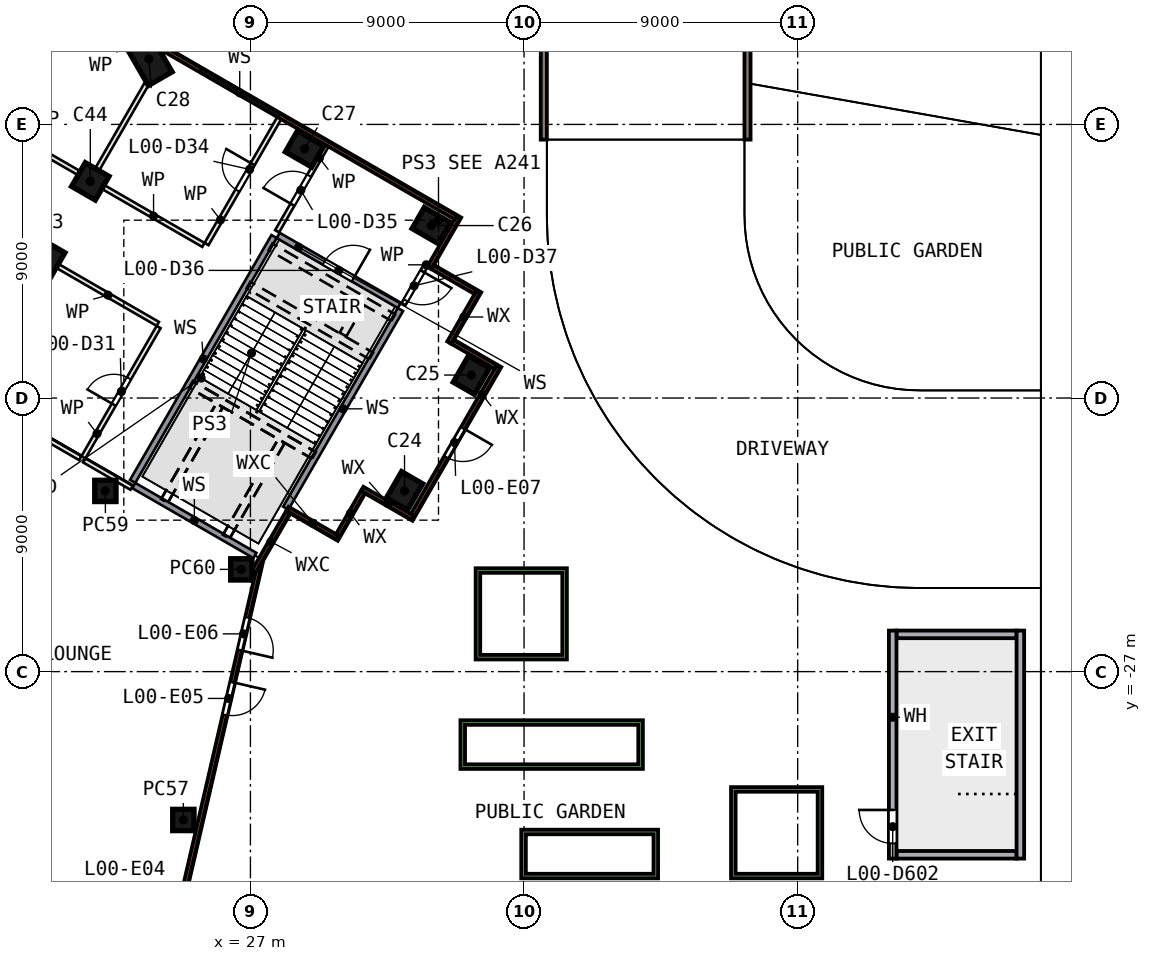
"""IFC4 building model, lengths in metres.
Left out: names, types, materials, properties, quantities, classifications, styles, units other than length and angle.
Written with IfcOpenShell. Run it as: python <this file> out.ifc"""

import sys

from ifc_helpers import new_model, si_unit, direction, frame, frame_2d, origin, origin_2d, place, context, subcontext, project, spatial, polyline, rectangle, outline, extrude, element, fill, save


model = new_model("IFC4")
c1 = context("Model", 3, precision=1e-05, world=origin(), true_north=direction((0.0, 1.0)))
c2 = subcontext(c1, "Body", "Model", "MODEL_VIEW")
j1 = project(units=[si_unit("LENGTHUNIT", "METRE"), si_unit("PLANEANGLEUNIT", "RADIAN")], contexts=[c1])
p1 = place(None, origin())
s1 = spatial("IfcSite", under=j1, at=p1, CompositionType="ELEMENT")
p2 = place(p1, origin())
s2 = spatial("IfcBuilding", under=s1, at=p2, CompositionType="ELEMENT")
p3 = place(p2, origin())
s3 = spatial("IfcBuildingStorey", under=s2, at=p3, CompositionType="ELEMENT", Elevation=0.0)
for number, where, z_axis, x_axis in (
    (1, (32.069, -21.055, 0.0), (0.0, 0.0, 1.0), (0.5, 0.866, 0.0)),
    (2, (34.269, -17.245, 0.0), (0.0, 0.0, 1.0), (0.5, 0.866, 0.0)),
    (3, (32.951, -12.327, 0.0), (0.0, 0.0, 1.0), (-0.866, 0.5, 0.0)),
    (4, (28.783, -9.805, 0.0), (0.0, 0.0, 1.0), (-0.866, 0.5, 0.0)),
):
    element("IfcColumn", number, at=place(p3, frame(where, z_axis=z_axis, x_axis=x_axis)), inside=s3, PredefinedType="COLUMN", context=c2, shape_type="SweptSolid", body=[
        extrude(rectangle(XDim=1.0, YDim=0.8, at=origin_2d()), origin(), (0.0, 0.0, 1.0), 7.55),
    ])
p4 = place(p3, frame((23.658, -6.846, 0.0), z_axis=(0.0, 0.0, 1.0), x_axis=(0.5, -0.866025404, 0.0)))
e5 = element("IfcColumn", 5, at=p4, inside=s3, PredefinedType="COLUMN", context=c2, shape_type="SweptSolid", body=[
    extrude(rectangle(XDim=1.5, YDim=0.9, at=origin_2d()), origin(), (0.0, 0.0, 1.0), 7.55),
])
for number, where, z_axis, x_axis in (
    (6, (20.283, -13.385, 0.0), (0.0, 0.0, 1.0), (0.866, -0.5, 0.0)),
    (7, (21.733, -10.873, 0.0), (0.0, 0.0, 1.0), (0.866, -0.5, 0.0)),
):
    element("IfcColumn", number, at=place(p3, frame(where, z_axis=z_axis, x_axis=x_axis)), inside=s3, PredefinedType="COLUMN", context=c2, shape_type="SweptSolid", body=[
        extrude(rectangle(XDim=0.9, YDim=0.9, at=origin_2d()), origin(), (0.0, 0.0, 1.0), 7.55),
    ])
for number, where, z_axis, x_axis in (
    (8, (24.794, -31.88, 0.0), (0.0, 0.0, 1.0), (0.0, -1.0, 0.0)),
    (9, (22.229, -21.055, 0.0), (0.0, 0.0, 1.0), (0.0, -1.0, 0.0)),
    (10, (26.7, -23.637, 0.0), (0.0, 0.0, 1.0), (0.0, -1.0, 0.0)),
):
    element("IfcColumn", number, at=place(p3, frame(where, z_axis=z_axis, x_axis=x_axis)), inside=s3, PredefinedType="COLUMN", context=c2, shape_type="SweptSolid", body=[
        extrude(rectangle(XDim=0.7, YDim=0.7, at=origin_2d()), origin(), (0.0, 0.0, 1.0), 8.0),
    ])
for number, where, z_axis, x_axis in (
    (11, (36.65, -9.5, -0.06), (0.0, 0.0, 1.0), (0.0, 1.0, 0.0)),
    (12, (43.35, -9.5, -0.06), (0.0, 0.0, 1.0), (0.0, 1.0, 0.0)),
):
    element("IfcWall", number, at=place(p3, frame(where, z_axis=z_axis, x_axis=x_axis)), inside=s3, PredefinedType="PARAPET", context=c2, shape_type="SweptSolid", body=[
        extrude(rectangle(XDim=18.7, YDim=0.2, at=frame_2d((9.35, 0.0))), origin(), (0.0, 0.0, 1.0), 1.18),
    ])
p5 = place(p3, frame((27.288, -23.537, 0.0), z_axis=(0.0, 0.0, 1.0), x_axis=(-0.22528195, -0.974293612, 0.0)))
e13 = element("IfcWall", 13, at=p5, inside=s3, PredefinedType="SOLIDWALL", context=c2, shape_type="SweptSolid", body=[
    extrude(rectangle(XDim=14.772, YDim=0.14, at=frame_2d((7.386, 0.0))), origin(), (0.0, 0.0, 1.0), 7.55),
])
p6 = place(p5, frame((10.815, 0.0, 0.0)))
e14 = element("IfcOpeningElement", 14, at=p6, cuts=e13, PredefinedType="OPENING", context=c2, shape_type="SweptSolid", body=[
    extrude(rectangle(XDim=1.1, YDim=2.4, at=frame_2d((0.55, 1.2))), frame((0.0, 0.08, 0.0), z_axis=(0.0, -1.0, 0.0), x_axis=(1.0, 0.0, 0.0)), (0.0, 0.0, 1.0), 0.16),
])
p7 = place(p5, frame((3.91, 0.0, 0.0)))
e15 = element("IfcOpeningElement", 15, at=p7, cuts=e13, PredefinedType="OPENING", context=c2, shape_type="SweptSolid", body=[
    extrude(rectangle(XDim=1.1, YDim=2.4, at=frame_2d((0.55, 1.2))), frame((0.0, 0.08, 0.0), z_axis=(0.0, -1.0, 0.0), x_axis=(1.0, 0.0, 0.0)), (0.0, 0.0, 1.0), 0.16),
])
p8 = place(p5, frame((1.73, 0.0, 0.0)))
e16 = element("IfcOpeningElement", 16, at=p8, cuts=e13, PredefinedType="OPENING", context=c2, shape_type="SweptSolid", body=[
    extrude(rectangle(XDim=1.1, YDim=2.4, at=frame_2d((0.55, 1.2))), frame((0.0, 0.08, 0.0), z_axis=(0.0, -1.0, 0.0), x_axis=(1.0, 0.0, 0.0)), (0.0, 0.0, 1.0), 0.16),
])
p9 = place(p3, frame((27.101, -23.72, 0.0), z_axis=(0.0, 0.0, 1.0), x_axis=(0.499965247, 0.866045467, 0.0)))
e17 = element("IfcWall", 17, at=p9, inside=s3, PredefinedType="SOLIDWALL", context=c2, shape_type="SweptSolid", body=[
    extrude(rectangle(XDim=2.292, YDim=0.14, at=frame_2d((1.146, 0.0))), origin(), (0.0, 0.0, 1.0), 7.55),
])
p10 = place(p3, frame((28.221, -21.64, 0.0), z_axis=(0.0, 0.0, 1.0), x_axis=(0.866011627, -0.500023862, 0.0)))
e18 = element("IfcWall", 18, at=p10, inside=s3, PredefinedType="SOLIDWALL", context=c2, shape_type="SweptSolid", body=[
    extrude(rectangle(XDim=1.94, YDim=0.14, at=frame_2d((0.97, 0.0))), origin(), (0.0, 0.0, 1.0), 7.55),
])
p11 = place(p3, frame((29.875, -22.514, 0.0), z_axis=(0.0, 0.0, 1.0), x_axis=(0.499998264, 0.866026406, 0.0)))
e19 = element("IfcWall", 19, at=p11, inside=s3, PredefinedType="SOLIDWALL", context=c2, shape_type="SweptSolid", body=[
    extrude(rectangle(XDim=1.66, YDim=0.14, at=frame_2d((0.83, 0.0))), origin(), (0.0, 0.0, 1.0), 7.55),
])
p12 = place(p3, frame((30.68, -20.981, 0.0), z_axis=(0.0, 0.0, 1.0), x_axis=(0.866043088, -0.499969368, 0.0)))
e20 = element("IfcWall", 20, at=p12, inside=s3, PredefinedType="SOLIDWALL", context=c2, shape_type="SweptSolid", body=[
    extrude(rectangle(XDim=1.94, YDim=0.14, at=frame_2d((0.97, 0.0))), origin(), (0.0, 0.0, 1.0), 7.55),
])
p13 = place(p3, frame((35.164, -16.954, 0.0), z_axis=(0.0, 0.0, 1.0), x_axis=(-0.499985074, -0.866034021, 0.0)))
e21 = element("IfcWall", 21, at=p13, inside=s3, PredefinedType="SOLIDWALL", context=c2, shape_type="SweptSolid", body=[
    extrude(rectangle(XDim=5.66, YDim=0.14, at=frame_2d((2.83, 0.0))), origin(), (0.0, 0.0, 1.0), 7.55),
])
p14 = place(p13, frame((2.35, 0.0, 0.0)))
e22 = element("IfcOpeningElement", 22, at=p14, cuts=e21, PredefinedType="OPENING", context=c2, shape_type="SweptSolid", body=[
    extrude(rectangle(XDim=1.1, YDim=2.4, at=frame_2d((0.55, 1.2))), frame((0.0, 0.08, 0.0), z_axis=(0.0, -1.0, 0.0), x_axis=(1.0, 0.0, 0.0)), (0.0, 0.0, 1.0), 0.16),
])
p15 = place(p3, frame((35.069, -16.979, 0.0), z_axis=(0.0, 0.0, 1.0), x_axis=(-0.866053324, 0.499951638, 0.0)))
e23 = element("IfcWall", 23, at=p15, inside=s3, PredefinedType="SOLIDWALL", context=c2, shape_type="SweptSolid", body=[
    extrude(rectangle(XDim=1.66, YDim=0.14, at=frame_2d((0.83, 0.0))), origin(), (0.0, 0.0, 1.0), 7.55),
])
p16 = place(p3, frame((33.535, -16.175, 0.0), z_axis=(0.0, 0.0, 1.0), x_axis=(0.500063744, 0.865988598, 0.0)))
e24 = element("IfcWall", 24, at=p16, inside=s3, PredefinedType="SOLIDWALL", context=c2, shape_type="SweptSolid", body=[
    extrude(rectangle(XDim=1.94, YDim=0.14, at=frame_2d((0.97, 0.0))), origin(), (0.0, 0.0, 1.0), 7.55),
])
p17 = place(p3, frame((34.41, -14.52, 0.0), z_axis=(0.0, 0.0, 1.0), x_axis=(-0.865989634, 0.500061949, 0.0)))
e25 = element("IfcWall", 25, at=p17, inside=s3, PredefinedType="SOLIDWALL", context=c2, shape_type="SweptSolid", body=[
    extrude(rectangle(XDim=1.66, YDim=0.14, at=frame_2d((0.83, 0.0))), origin(), (0.0, 0.0, 1.0), 7.55),
])
p18 = place(p3, frame((32.877, -13.716, 0.0), z_axis=(0.0, 0.0, 1.0), x_axis=(0.500023862, 0.866011627, 0.0)))
e26 = element("IfcWall", 26, at=p18, inside=s3, PredefinedType="SOLIDWALL", context=c2, shape_type="SweptSolid", body=[
    extrude(rectangle(XDim=1.94, YDim=0.14, at=frame_2d((0.97, 0.0))), origin(), (0.0, 0.0, 1.0), 7.55),
])
p19 = place(p3, frame((33.751, -12.062, 0.0), z_axis=(0.0, 0.0, 1.0), x_axis=(-0.86602647, 0.499998154, 0.0)))
e27 = element("IfcWall", 27, at=p19, inside=s3, PredefinedType="SOLIDWALL", context=c2, shape_type="SweptSolid", body=[
    extrude(rectangle(XDim=10.961, YDim=0.14, at=frame_2d((5.481, 0.0))), origin(), (0.0, 0.0, 1.0), 7.55),
])
p20 = place(p19, frame((6.702, 0.0, 0.15)))
e28 = element("IfcOpeningElement", 28, at=p20, cuts=e27, PredefinedType="OPENING", context=c2, shape_type="SweptSolid", body=[
    extrude(rectangle(XDim=3.0, YDim=4.2, at=frame_2d((1.5, 2.1))), frame((0.0, 0.08, 0.0), z_axis=(0.0, -1.0, 0.0), x_axis=(1.0, 0.0, 0.0)), (0.0, 0.0, 1.0), 0.16),
])
p21 = place(p3, origin())
e29 = element("IfcWall", 29, at=p21, inside=s3, PredefinedType="SOLIDWALL", context=c2, shape_type="SweptSolid", body=[
    extrude(outline(polyline([(35.908, -33.8), (40.408, -33.8), (40.408, -32.2), (35.908, -32.2), (35.908, -33.8)]), holes=[polyline([(36.058, -33.65), (36.058, -32.35), (40.258, -32.35), (40.258, -33.65), (36.058, -33.65)])]), origin(), (0.0, 0.0, 1.0), 0.6),
])
p22 = place(p3, origin())
e30 = element("IfcWall", 30, at=p22, inside=s3, PredefinedType="SOLIDWALL", context=c2, shape_type="SweptSolid", body=[
    extrude(outline(polyline([(42.808, -33.8), (45.808, -33.8), (45.808, -30.8), (42.808, -30.8), (42.808, -33.8)]), holes=[polyline([(42.958, -33.65), (42.958, -30.95), (45.658, -30.95), (45.658, -33.65), (42.958, -33.65)])]), origin(), (0.0, 0.0, 1.0), 0.6),
])
p23 = place(p3, origin())
e31 = element("IfcWall", 31, at=p23, inside=s3, PredefinedType="SOLIDWALL", context=c2, shape_type="SweptSolid", body=[
    extrude(outline(polyline([(33.908, -30.2), (39.908, -30.2), (39.908, -28.6), (33.908, -28.6), (33.908, -30.2)]), holes=[polyline([(34.058, -30.05), (34.058, -28.75), (39.758, -28.75), (39.758, -30.05), (34.058, -30.05)])]), origin(), (0.0, 0.0, 1.0), 0.6),
])
p24 = place(p3, origin())
e32 = element("IfcWall", 32, at=p24, inside=s3, PredefinedType="SOLIDWALL", context=c2, shape_type="SweptSolid", body=[
    extrude(outline(polyline([(34.408, -26.6), (37.408, -26.6), (37.408, -23.6), (34.408, -23.6), (34.408, -26.6)]), holes=[polyline([(34.558, -26.45), (34.558, -23.75), (37.258, -23.75), (37.258, -26.45), (34.558, -26.45)])]), origin(), (0.0, 0.0, 1.0), 0.6),
])
p25 = place(p3, frame((20.674, -13.668, 0.0), z_axis=(0.0, 0.0, 1.0), x_axis=(0.866024533, -0.500001508, 0.0)))
e33 = element("IfcWall", 33, at=p25, inside=s3, PredefinedType="PARTITIONING", context=c2, shape_type="SweptSolid", body=[
    extrude(rectangle(XDim=3.787, YDim=0.15, at=frame_2d((1.893, 0.0))), origin(), (0.0, 0.0, 1.0), 7.55),
])
p26 = place(p3, frame((17.773, -17.882, 0.0), z_axis=(0.0, 0.0, 1.0), x_axis=(0.866005191, -0.500035008, 0.0)))
e34 = element("IfcWall", 34, at=p26, inside=s3, PredefinedType="PARTITIONING", context=c2, shape_type="SweptSolid", body=[
    extrude(rectangle(XDim=4.192, YDim=0.15, at=frame_2d((2.096, 0.0))), origin(), (0.0, 0.0, 1.0), 7.55),
])
p27 = place(p3, frame((21.533, -20.053, 0.0), z_axis=(0.0, 0.0, 1.0), x_axis=(0.865989076, -0.500062917, 0.0)))
e35 = element("IfcWall", 35, at=p27, inside=s3, PredefinedType="PARTITIONING", context=c2, shape_type="SweptSolid", body=[
    extrude(rectangle(XDim=1.8, YDim=0.15, at=frame_2d((0.9, 0.0))), origin(), (0.0, 0.0, 1.0), 7.55),
])
p28 = place(p3, frame((21.973, -10.458, 0.0), z_axis=(0.0, 0.0, 1.0), x_axis=(0.500009422, 0.866019964, 0.0)))
e36 = element("IfcWall", 36, at=p28, inside=s3, PredefinedType="PARTITIONING", context=c2, shape_type="SweptSolid", body=[
    extrude(rectangle(XDim=3.216, YDim=0.15, at=frame_2d((1.608, 0.0))), origin(), (0.0, 0.0, 1.0), 7.55),
])
p29 = place(p3, frame((23.164, -20.879, 0.0), z_axis=(0.0, 0.0, 1.0), x_axis=(0.866030039, -0.499991972, 0.0)))
e37 = element("IfcWall", 37, at=p29, inside=s3, PredefinedType="SOLIDWALL", context=c2, shape_type="SweptSolid", body=[
    extrude(rectangle(XDim=4.6, YDim=0.2, at=frame_2d((2.3, 0.0))), origin(), (0.0, 0.0, 1.0), 7.55),
])
p30 = place(p3, frame((21.506, -19.951, 0.0), z_axis=(0.0, 0.0, 1.0), x_axis=(0.499995708, 0.866027882, 0.0)))
e38 = element("IfcWall", 38, at=p30, inside=s3, PredefinedType="PARTITIONING", context=c2, shape_type="SweptSolid", body=[
    extrude(rectangle(XDim=4.95, YDim=0.15, at=frame_2d((2.475, 0.0))), origin(), (0.0, 0.0, 1.0), 7.55),
])
p31 = place(p30, frame((2.0, 0.0, 0.0)))
e39 = element("IfcOpeningElement", 39, at=p31, cuts=e38, PredefinedType="OPENING", context=c2, shape_type="SweptSolid", body=[
    extrude(rectangle(XDim=1.0, YDim=2.1, at=frame_2d((0.5, 1.05))), frame((0.0, 0.085, 0.0), z_axis=(0.0, -1.0, 0.0), x_axis=(1.0, 0.0, 0.0)), (0.0, 0.0, 1.0), 0.17),
])
p32 = place(p3, frame((16.194, -7.618, 0.0), z_axis=(0.0, 0.0, 1.0), x_axis=(0.866028293, -0.499994996, 0.0)))
e40 = element("IfcWall", 40, at=p32, inside=s3, PredefinedType="PARTITIONING", context=c2, shape_type="SweptSolid", body=[
    extrude(rectangle(XDim=5.945, YDim=0.15, at=frame_2d((2.972, 0.0))), origin(), (0.0, 0.0, 1.0), 7.55),
])
p33 = place(p32, frame((2.395, 0.0, 0.0)))
e41 = element("IfcOpeningElement", 41, at=p33, cuts=e40, PredefinedType="OPENING", context=c2, shape_type="SweptSolid", body=[
    extrude(rectangle(XDim=1.0, YDim=2.1, at=frame_2d((0.5, 1.05))), frame((0.0, 0.085, 0.0), z_axis=(0.0, -1.0, 0.0), x_axis=(1.0, 0.0, 0.0)), (0.0, 0.0, 1.0), 0.17),
])
p34 = place(p3, frame((25.453, -12.963, 0.0), z_axis=(0.0, 0.0, 1.0), x_axis=(-0.866024533, 0.500001508, 0.0)))
e42 = element("IfcWall", 42, at=p34, inside=s3, PredefinedType="PARTITIONING", context=c2, shape_type="SweptSolid", body=[
    extrude(rectangle(XDim=3.787, YDim=0.15, at=frame_2d((1.893, 0.0))), origin(), (0.0, 0.0, 1.0), 7.55),
])
p35 = place(p3, frame((28.162, -21.623, 0.0), z_axis=(0.0, 0.0, 1.0), x_axis=(0.499981072, 0.866036332, 0.0)))
e43 = element("IfcWall", 43, at=p35, inside=s3, PredefinedType="SOLIDWALL", context=c2, shape_type="SweptSolid", body=[
    extrude(rectangle(XDim=7.545, YDim=0.2, at=frame_2d((3.772, 0.0))), origin(), (0.0, 0.0, 1.0), 7.55),
])
p36 = place(p3, frame((27.777, -12.688, 0.0), z_axis=(0.0, 0.0, 1.0), x_axis=(-0.500004225, -0.866022964, 0.0)))
e44 = element("IfcWall", 44, at=p36, inside=s3, PredefinedType="SOLIDWALL", context=c2, shape_type="SweptSolid", body=[
    extrude(rectangle(XDim=9.3, YDim=0.2, at=frame_2d((4.65, 0.0))), origin(), (0.0, 0.0, 1.0), 7.55),
])
p37 = place(p3, frame((25.556, -12.936, 0.0), z_axis=(0.0, 0.0, 1.0), x_axis=(0.499963896, 0.866046247, 0.0)))
e45 = element("IfcWall", 45, at=p37, inside=s3, PredefinedType="PARTITIONING", context=c2, shape_type="SweptSolid", body=[
    extrude(rectangle(XDim=4.785, YDim=0.15, at=frame_2d((2.393, 0.0))), origin(), (0.0, 0.0, 1.0), 7.55),
])
p38 = place(p37, frame((2.035, 0.0, 0.0)))
e46 = element("IfcOpeningElement", 46, at=p38, cuts=e45, PredefinedType="OPENING", context=c2, shape_type="SweptSolid", body=[
    extrude(rectangle(XDim=1.0, YDim=2.1, at=frame_2d((0.5, 1.05))), frame((0.0, 0.085, 0.0), z_axis=(0.0, -1.0, 0.0), x_axis=(1.0, 0.0, 0.0)), (0.0, 0.0, 1.0), 0.17),
])
p39 = place(p3, frame((27.877, -12.515, 0.0), z_axis=(0.0, 0.0, 1.0), x_axis=(0.499973122, 0.866040921, 0.0)))
e47 = element("IfcWall", 47, at=p39, inside=s3, PredefinedType="PARTITIONING", context=c2, shape_type="SweptSolid", body=[
    extrude(rectangle(XDim=3.26, YDim=0.15, at=frame_2d((1.63, 0.0))), origin(), (0.0, 0.0, 1.0), 7.55),
])
p40 = place(p39, frame((1.01, 0.0, 0.0)))
e48 = element("IfcOpeningElement", 48, at=p40, cuts=e47, PredefinedType="OPENING", context=c2, shape_type="SweptSolid", body=[
    extrude(rectangle(XDim=1.1, YDim=2.1, at=frame_2d((0.55, 1.05))), frame((0.0, 0.085, 0.0), z_axis=(0.0, -1.0, 0.0), x_axis=(1.0, 0.0, 0.0)), (0.0, 0.0, 1.0), 0.17),
])
p41 = place(p3, frame((27.914, -12.652, 0.0), z_axis=(0.0, 0.0, 1.0), x_axis=(0.86601677, -0.500014953, 0.0)))
e49 = element("IfcWall", 49, at=p41, inside=s3, PredefinedType="SOLIDWALL", context=c2, shape_type="SweptSolid", body=[
    extrude(rectangle(XDim=4.6, YDim=0.2, at=frame_2d((2.3, 0.0))), origin(), (0.0, 0.0, 1.0), 7.55),
])
p42 = place(p41, frame((1.75, 0.0, 0.0)))
e50 = element("IfcOpeningElement", 50, at=p42, cuts=e49, PredefinedType="OPENING", context=c2, shape_type="SweptSolid", body=[
    extrude(rectangle(XDim=1.1, YDim=2.1, at=frame_2d((0.55, 1.05))), frame((0.0, 0.11, 0.0), z_axis=(0.0, -1.0, 0.0), x_axis=(1.0, 0.0, 0.0)), (0.0, 0.0, 1.0), 0.22),
])
p43 = place(p3, frame((32.807, -13.577, 0.0), z_axis=(0.0, 0.0, 1.0), x_axis=(-0.499995951, -0.866027742, 0.0)))
e51 = element("IfcWall", 51, at=p43, inside=s3, PredefinedType="PARTITIONING", context=c2, shape_type="SweptSolid", body=[
    extrude(rectangle(XDim=1.545, YDim=0.15, at=frame_2d((0.773, 0.0))), origin(), (0.0, 0.0, 1.0), 7.55),
])
p44 = place(p43, frame((0.295, 0.0, 0.0)))
e52 = element("IfcOpeningElement", 52, at=p44, cuts=e51, PredefinedType="OPENING", context=c2, shape_type="SweptSolid", body=[
    extrude(rectangle(XDim=1.1, YDim=2.1, at=frame_2d((0.55, 1.05))), frame((0.0, 0.085, 0.0), z_axis=(0.0, -1.0, 0.0), x_axis=(1.0, 0.0, 0.0)), (0.0, 0.0, 1.0), 0.17),
])
p45 = place(p3, frame((48.125, -33.15, 0.0), z_axis=(0.0, 0.0, 1.0), x_axis=(0.0, 1.0, 0.0)))
e53 = element("IfcWall", 53, at=p45, inside=s3, PredefinedType="SOLIDWALL", context=c2, shape_type="SweptSolid", body=[
    extrude(rectangle(XDim=7.5, YDim=0.25, at=frame_2d((3.75, 0.0))), origin(), (0.0, 0.0, 1.0), 3.4),
])
p46 = place(p45, frame((0.5, 0.0, 0.0)))
e54 = element("IfcOpeningElement", 54, at=p46, cuts=e53, PredefinedType="OPENING", context=c2, shape_type="SweptSolid", body=[
    extrude(rectangle(XDim=1.1, YDim=2.1, at=frame_2d((0.55, 1.05))), frame((0.0, 0.135, 0.0), z_axis=(0.0, -1.0, 0.0), x_axis=(1.0, 0.0, 0.0)), (0.0, 0.0, 1.0), 0.27),
])
p47 = place(p3, frame((52.325, -33.15, 0.0), z_axis=(0.0, 0.0, 1.0), x_axis=(0.0, 1.0, 0.0)))
e55 = element("IfcWall", 55, at=p47, inside=s3, PredefinedType="SOLIDWALL", context=c2, shape_type="SweptSolid", body=[
    extrude(rectangle(XDim=7.5, YDim=0.25, at=frame_2d((3.75, 0.0))), origin(), (0.0, 0.0, 1.0), 3.4),
])
for number, where, z_axis, x_axis in (
    (56, (52.2, -33.025, 0.0), (0.0, 0.0, 1.0), (-1.0, 0.0, 0.0)),
    (57, (52.2, -25.775, 0.0), (0.0, 0.0, 1.0), (-1.0, 0.0, 0.0)),
):
    element("IfcWall", number, at=place(p3, frame(where, z_axis=z_axis, x_axis=x_axis)), inside=s3, PredefinedType="SOLIDWALL", context=c2, shape_type="SweptSolid", body=[
        extrude(rectangle(XDim=3.95, YDim=0.25, at=frame_2d((1.975, 0.0))), origin(), (0.0, 0.0, 1.0), 3.4),
    ])
p48 = place(p7, origin())
e58 = element("IfcDoor", 58, at=p48, inside=s3, OperationType="SINGLE_SWING_LEFT", PredefinedType="DOOR", context=c2, shape_type="SweptSolid", body=[
    extrude(rectangle(XDim=1.1, YDim=2.4, at=frame_2d((0.55, 1.2))), frame((0.0, 0.025, 0.0), z_axis=(0.0, -1.0, 0.0), x_axis=(1.0, 0.0, 0.0)), (0.0, 0.0, 1.0), 0.05),
])
fill(e15, e58)
p49 = place(p8, origin())
e59 = element("IfcDoor", 59, at=p49, inside=s3, OperationType="SINGLE_SWING_RIGHT", PredefinedType="DOOR", context=c2, shape_type="SweptSolid", body=[
    extrude(rectangle(XDim=1.1, YDim=2.4, at=frame_2d((0.55, 1.2))), frame((0.0, 0.025, 0.0), z_axis=(0.0, -1.0, 0.0), x_axis=(1.0, 0.0, 0.0)), (0.0, 0.0, 1.0), 0.05),
])
fill(e16, e59)
p50 = place(p14, origin())
e60 = element("IfcDoor", 60, at=p50, inside=s3, OperationType="SINGLE_SWING_LEFT", PredefinedType="DOOR", context=c2, shape_type="SweptSolid", body=[
    extrude(rectangle(XDim=1.1, YDim=2.4, at=frame_2d((0.55, 1.2))), frame((0.0, 0.025, 0.0), z_axis=(0.0, -1.0, 0.0), x_axis=(1.0, 0.0, 0.0)), (0.0, 0.0, 1.0), 0.05),
])
fill(e22, e60)
p51 = place(p20, origin())
e61 = element("IfcWindow", 61, at=p51, inside=s3, PartitioningType="SINGLE_PANEL", PredefinedType="WINDOW", context=c2, shape_type="SweptSolid", body=[
    extrude(rectangle(XDim=3.0, YDim=4.2, at=frame_2d((1.5, 2.1))), frame((0.0, 0.03, 0.0), z_axis=(0.0, -1.0, 0.0), x_axis=(1.0, 0.0, 0.0)), (0.0, 0.0, 1.0), 0.06),
])
fill(e28, e61)
p52 = place(p31, origin())
e62 = element("IfcDoor", 62, at=p52, inside=s3, OperationType="SINGLE_SWING_LEFT", PredefinedType="DOOR", context=c2, shape_type="SweptSolid", body=[
    extrude(rectangle(XDim=1.0, YDim=2.1, at=frame_2d((0.5, 1.05))), frame((0.0, 0.025, 0.0), z_axis=(0.0, -1.0, 0.0), x_axis=(1.0, 0.0, 0.0)), (0.0, 0.0, 1.0), 0.05),
])
fill(e39, e62)
p53 = place(p38, origin())
e63 = element("IfcDoor", 63, at=p53, inside=s3, OperationType="SINGLE_SWING_RIGHT", PredefinedType="DOOR", context=c2, shape_type="SweptSolid", body=[
    extrude(rectangle(XDim=1.0, YDim=2.1, at=frame_2d((0.5, 1.05))), frame((0.0, 0.025, 0.0), z_axis=(0.0, -1.0, 0.0), x_axis=(1.0, 0.0, 0.0)), (0.0, 0.0, 1.0), 0.05),
])
fill(e46, e63)
p54 = place(p40, origin())
e64 = element("IfcDoor", 64, at=p54, inside=s3, OperationType="SINGLE_SWING_LEFT", PredefinedType="DOOR", context=c2, shape_type="SweptSolid", body=[
    extrude(rectangle(XDim=1.1, YDim=2.1, at=frame_2d((0.55, 1.05))), frame((0.0, 0.025, 0.0), z_axis=(0.0, -1.0, 0.0), x_axis=(1.0, 0.0, 0.0)), (0.0, 0.0, 1.0), 0.05),
])
fill(e48, e64)
p55 = place(p42, origin())
e65 = element("IfcDoor", 65, at=p55, inside=s3, OperationType="SINGLE_SWING_RIGHT", PredefinedType="DOOR", context=c2, shape_type="SweptSolid", body=[
    extrude(rectangle(XDim=1.1, YDim=2.1, at=frame_2d((0.55, 1.05))), frame((0.0, 0.025, 0.0), z_axis=(0.0, -1.0, 0.0), x_axis=(1.0, 0.0, 0.0)), (0.0, 0.0, 1.0), 0.05),
])
fill(e50, e65)
p56 = place(p44, origin())
e66 = element("IfcDoor", 66, at=p56, inside=s3, OperationType="SINGLE_SWING_LEFT", PredefinedType="DOOR", context=c2, shape_type="SweptSolid", body=[
    extrude(rectangle(XDim=1.1, YDim=2.1, at=frame_2d((0.55, 1.05))), frame((0.0, 0.025, 0.0), z_axis=(0.0, -1.0, 0.0), x_axis=(1.0, 0.0, 0.0)), (0.0, 0.0, 1.0), 0.05),
])
fill(e52, e66)
p57 = place(p46, origin())
e67 = element("IfcDoor", 67, at=p57, inside=s3, OperationType="SINGLE_SWING_RIGHT", PredefinedType="DOOR", context=c2, shape_type="SweptSolid", body=[
    extrude(rectangle(XDim=1.1, YDim=2.1, at=frame_2d((0.55, 1.05))), frame((0.0, 0.025, 0.0), z_axis=(0.0, -1.0, 0.0), x_axis=(1.0, 0.0, 0.0)), (0.0, 0.0, 1.0), 0.05),
])
fill(e54, e67)
save(model, sys.argv[1])
